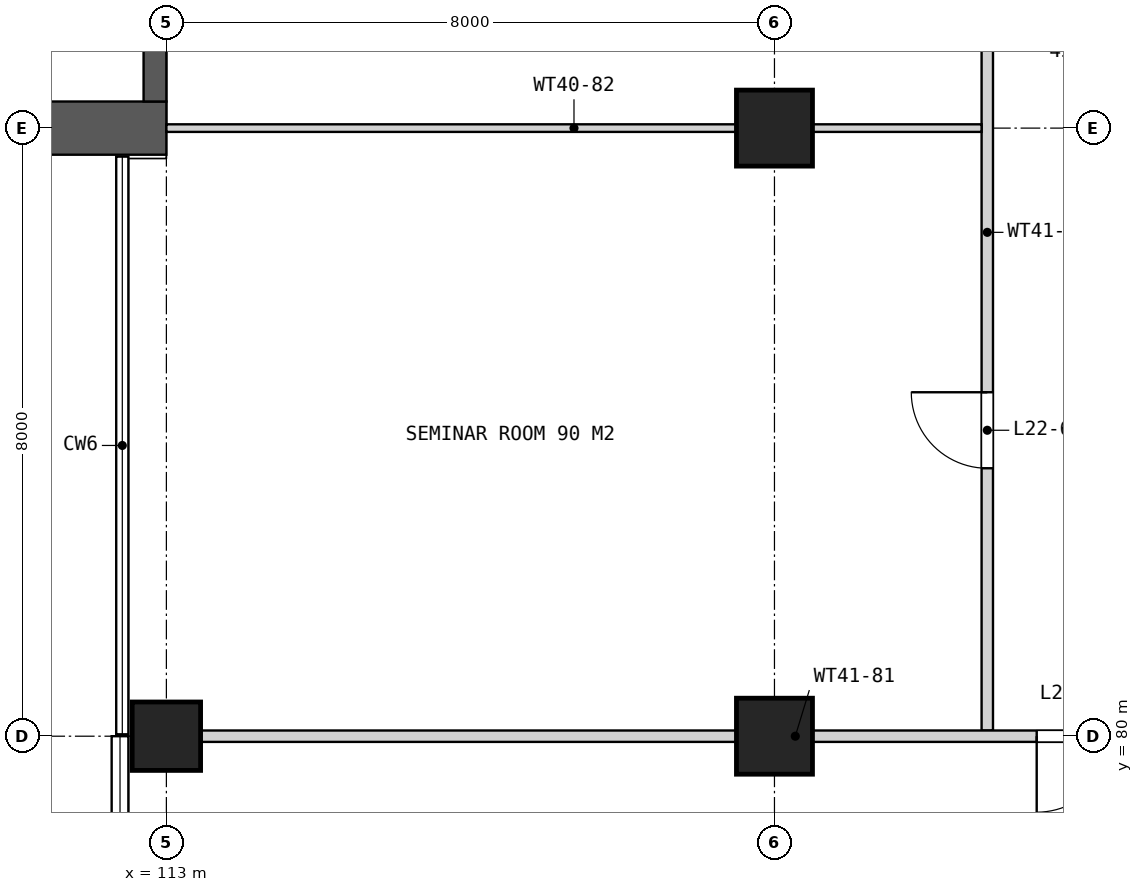
"""IFC4 building model, lengths in metres.
Left out: names, types, materials, properties, quantities, classifications, styles, units other than length and angle.
Written with IfcOpenShell. Run it as: python <this file> out.ifc"""

import sys

from ifc_helpers import new_model, si_unit, direction, frame, frame_2d, origin, origin_2d, place, context, subcontext, project, spatial, rectangle, extrude, element, fill, save


model = new_model("IFC4")
c1 = context("Model", 3, precision=1e-05, world=origin(), true_north=direction((0.0, 1.0)))
c2 = subcontext(c1, "Body", "Model", "MODEL_VIEW")
j1 = project(units=[si_unit("LENGTHUNIT", "METRE"), si_unit("PLANEANGLEUNIT", "RADIAN")], contexts=[c1])
p1 = place(None, origin())
s1 = spatial("IfcSite", under=j1, at=p1, CompositionType="ELEMENT")
p2 = place(p1, origin())
s2 = spatial("IfcBuilding", under=s1, at=p2, CompositionType="ELEMENT")
p3 = place(p2, frame((0.0, 0.0, 112.7)))
s3 = spatial("IfcBuildingStorey", under=s2, at=p3, CompositionType="ELEMENT", Elevation=112.7)
p4 = place(p3, frame((113.0, 80.0, 0.0), z_axis=(0.0, 0.0, 1.0), x_axis=(1.0, 0.0, 0.0)))
e1 = element("IfcColumn", 1, at=p4, inside=s3, PredefinedType="COLUMN", context=c2, shape_type="SweptSolid", body=[
    extrude(rectangle(XDim=0.9, YDim=0.9, at=origin_2d()), origin(), (0.0, 0.0, 1.0), 4.2),
])
for number, where, z_axis, x_axis in (
    (2, (121.0, 80.0, 0.0), (0.0, 0.0, 1.0), (1.0, 0.0, 0.0)),
    (3, (121.0, 88.0, 0.0), (0.0, 0.0, 1.0), (1.0, 0.0, 0.0)),
):
    element("IfcColumn", number, at=place(p3, frame(where, z_axis=z_axis, x_axis=x_axis)), inside=s3, PredefinedType="COLUMN", context=c2, shape_type="SweptSolid", body=[
        extrude(rectangle(XDim=1.0, YDim=1.0, at=origin_2d()), origin(), (0.0, 0.0, 1.0), 4.2),
    ])
p5 = place(p3, frame((113.0, 88.0, 0.0), z_axis=(0.0, 0.0, 1.0), x_axis=(-1.0, 0.0, 0.0)))
e4 = element("IfcWall", 4, at=p5, inside=s3, PredefinedType="SHEAR", context=c2, shape_type="SweptSolid", body=[
    extrude(rectangle(XDim=7.1, YDim=0.7, at=frame_2d((3.55, 0.0))), origin(), (0.0, 0.0, 1.0), 4.2),
])
p6 = place(p3, frame((112.85, 94.3, 0.0), z_axis=(0.0, 0.0, 1.0), x_axis=(0.0, -1.0, 0.0)))
e5 = element("IfcWall", 5, at=p6, inside=s3, PredefinedType="SHEAR", context=c2, shape_type="SweptSolid", body=[
    extrude(rectangle(XDim=5.95, YDim=0.3, at=frame_2d((2.975, 0.0))), origin(), (0.0, 0.0, 1.0), 4.2),
])
p7 = place(p3, frame((123.8, 80.075, 0.0), z_axis=(0.0, 0.0, 1.0), x_axis=(0.0, 1.0, 0.0)))
e6 = element("IfcWall", 6, at=p7, inside=s3, PredefinedType="PARTITIONING", context=c2, shape_type="SweptSolid", body=[
    extrude(rectangle(XDim=18.725, YDim=0.15, at=frame_2d((9.363, 0.0))), origin(), (0.0, 0.0, 1.0), 3.437),
])
p8 = place(p7, frame((16.975, 0.0, 0.0)))
e7 = element("IfcOpeningElement", 7, at=p8, cuts=e6, PredefinedType="OPENING", context=c2, shape_type="SweptSolid", body=[
    extrude(rectangle(XDim=1.0, YDim=2.1, at=frame_2d((0.5, 1.05))), frame((0.0, 0.085, 0.0), z_axis=(0.0, -1.0, 0.0), x_axis=(1.0, 0.0, 0.0)), (0.0, 0.0, 1.0), 0.17),
])
p9 = place(p7, frame((14.575, 0.0, 0.0)))
e8 = element("IfcOpeningElement", 8, at=p9, cuts=e6, PredefinedType="OPENING", context=c2, shape_type="SweptSolid", body=[
    extrude(rectangle(XDim=1.0, YDim=2.1, at=frame_2d((0.5, 1.05))), frame((0.0, 0.085, 0.0), z_axis=(0.0, -1.0, 0.0), x_axis=(1.0, 0.0, 0.0)), (0.0, 0.0, 1.0), 0.17),
])
p10 = place(p7, frame((10.375, 0.0, 0.0)))
e9 = element("IfcOpeningElement", 9, at=p10, cuts=e6, PredefinedType="OPENING", context=c2, shape_type="SweptSolid", body=[
    extrude(rectangle(XDim=1.0, YDim=2.1, at=frame_2d((0.5, 1.05))), frame((0.0, 0.085, 0.0), z_axis=(0.0, -1.0, 0.0), x_axis=(1.0, 0.0, 0.0)), (0.0, 0.0, 1.0), 0.17),
])
p11 = place(p7, frame((3.45, 0.0, 0.0)))
e10 = element("IfcOpeningElement", 10, at=p11, cuts=e6, PredefinedType="OPENING", context=c2, shape_type="SweptSolid", body=[
    extrude(rectangle(XDim=1.0, YDim=2.1, at=frame_2d((0.5, 1.05))), frame((0.0, 0.085, 0.0), z_axis=(0.0, -1.0, 0.0), x_axis=(1.0, 0.0, 0.0)), (0.0, 0.0, 1.0), 0.17),
])
p12 = place(p3, frame((112.58, 80.0, 0.0), z_axis=(0.0, 0.0, 1.0), x_axis=(1.0, 0.0, 0.0)))
e11 = element("IfcWall", 11, at=p12, inside=s3, PredefinedType="PARTITIONING", context=c2, shape_type="SweptSolid", body=[
    extrude(rectangle(XDim=24.84, YDim=0.15, at=frame_2d((12.42, 0.0))), origin(), (0.0, 0.0, 1.0), 3.437),
])
p13 = place(p12, frame((11.87, 0.0, 0.0)))
e12 = element("IfcOpeningElement", 12, at=p13, cuts=e11, PredefinedType="OPENING", context=c2, shape_type="SweptSolid", body=[
    extrude(rectangle(XDim=1.0, YDim=2.1, at=frame_2d((0.5, 1.05))), frame((0.0, 0.085, 0.0), z_axis=(0.0, -1.0, 0.0), x_axis=(1.0, 0.0, 0.0)), (0.0, 0.0, 1.0), 0.17),
])
p14 = place(p3, frame((113.0, 88.0, 0.0), z_axis=(0.0, 0.0, 1.0), x_axis=(1.0, 0.0, 0.0)))
e13 = element("IfcWall", 13, at=p14, inside=s3, PredefinedType="PARTITIONING", context=c2, shape_type="SweptSolid", body=[
    extrude(rectangle(XDim=10.725, YDim=0.1, at=frame_2d((5.363, 0.0))), origin(), (0.0, 0.0, 1.0), 3.437),
])
p15 = place(p11, origin())
e14 = element("IfcDoor", 14, at=p15, inside=s3, OperationType="SINGLE_SWING_RIGHT", PredefinedType="DOOR", context=c2, shape_type="SweptSolid", body=[
    extrude(rectangle(XDim=1.0, YDim=2.1, at=frame_2d((0.5, 1.05))), frame((0.0, 0.025, 0.0), z_axis=(0.0, -1.0, 0.0), x_axis=(1.0, 0.0, 0.0)), (0.0, 0.0, 1.0), 0.05),
])
fill(e10, e14)
p16 = place(p13, frame((1.0, 0.0, 0.0), z_axis=(0.0, 0.0, 1.0), x_axis=(-1.0, 0.0, 0.0)))
e15 = element("IfcDoor", 15, at=p16, inside=s3, OperationType="SINGLE_SWING_RIGHT", PredefinedType="DOOR", context=c2, shape_type="SweptSolid", body=[
    extrude(rectangle(XDim=1.0, YDim=2.1, at=frame_2d((0.5, 1.05))), frame((0.0, 0.025, 0.0), z_axis=(0.0, -1.0, 0.0), x_axis=(1.0, 0.0, 0.0)), (0.0, 0.0, 1.0), 0.05),
])
fill(e12, e15)
save(model, sys.argv[1])
